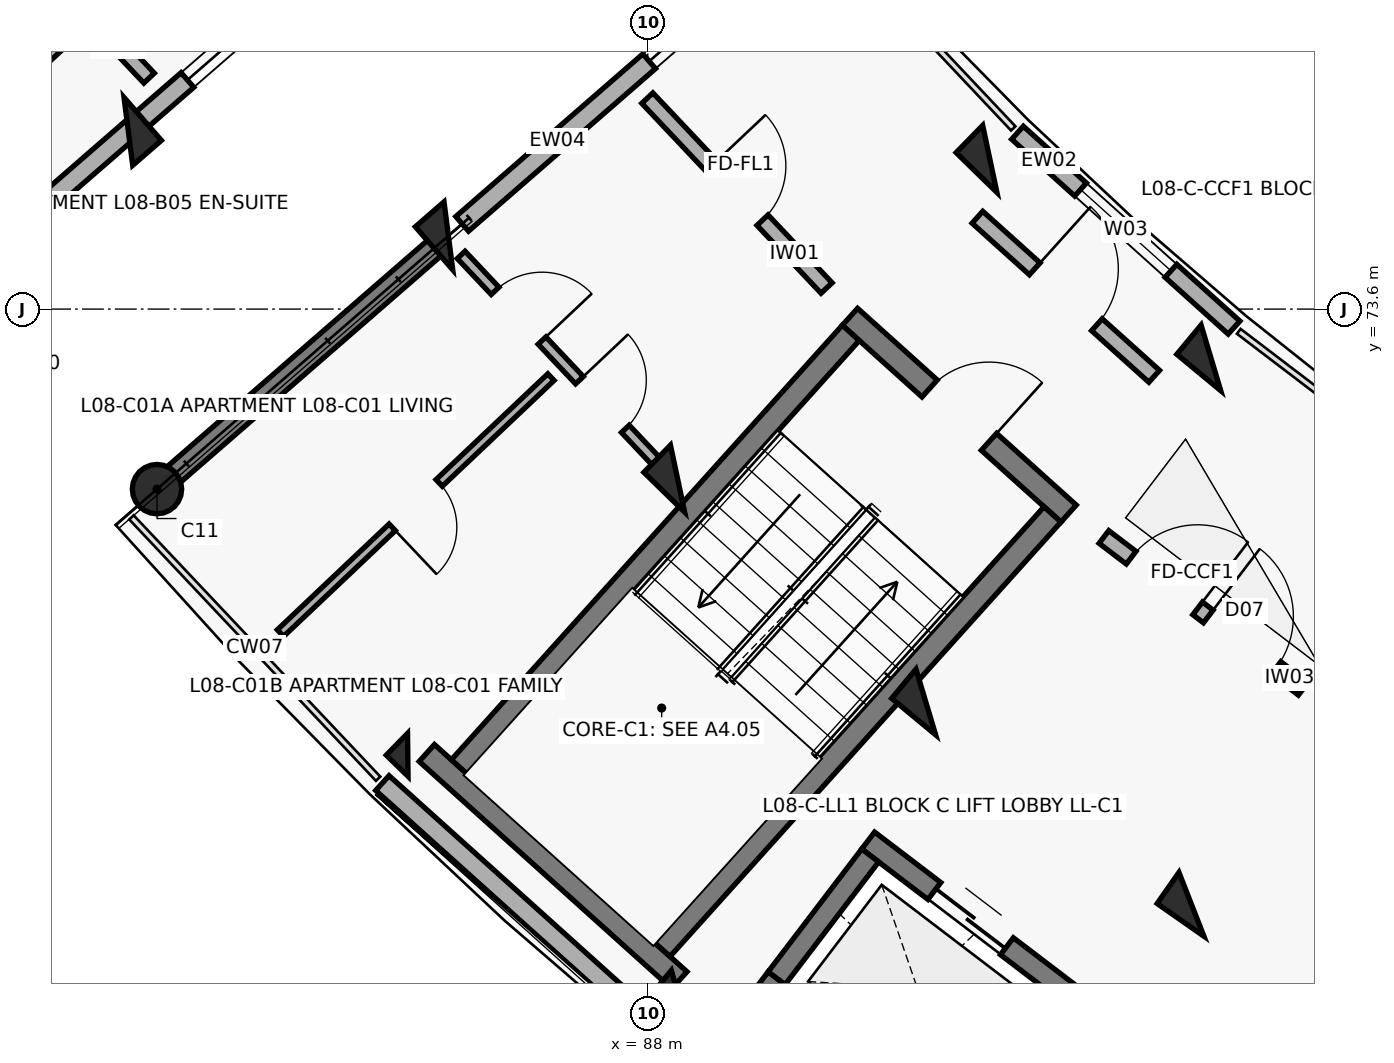
"""IFC4 building model, lengths in metres.
Left out: names, types, materials, properties, quantities, classifications, styles, units other than length and angle.
Written with IfcOpenShell. Run it as: python <this file> out.ifc"""

import sys

from ifc_helpers import new_model, si_unit, direction, frame, frame_2d, origin, origin_2d, place, context, subcontext, project, spatial, rectangle, circle, extrude, element, fill, save


model = new_model("IFC4")
c1 = context("Model", 3, precision=1e-05, world=origin(), true_north=direction((0.0, 1.0)))
c2 = subcontext(c1, "Body", "Model", "MODEL_VIEW")
j1 = project(units=[si_unit("LENGTHUNIT", "METRE"), si_unit("PLANEANGLEUNIT", "RADIAN")], contexts=[c1])
p1 = place(None, origin())
s1 = spatial("IfcSite", under=j1, at=p1, CompositionType="ELEMENT")
p2 = place(p1, origin())
s2 = spatial("IfcBuilding", under=s1, at=p2, CompositionType="ELEMENT")
p3 = place(p2, frame((0.0, 0.0, 26.7)))
s3 = spatial("IfcBuildingStorey", under=s2, at=p3, CompositionType="ELEMENT", Elevation=26.7)
for number, where, z_axis, x_axis in (
    (1, (81.166, 75.938, 0.0), (0.0, 0.0, 1.0), (0.755, 0.656, 0.0)),
    (2, (85.377, 74.564, 0.0), (0.0, 0.0, 1.0), (-0.755, -0.656, 0.0)),
):
    element("IfcColumn", number, at=place(p3, frame(where, z_axis=z_axis, x_axis=x_axis)), inside=s3, PredefinedType="COLUMN", context=c2, shape_type="SweptSolid", body=[
        extrude(rectangle(XDim=0.5, YDim=0.75, at=origin_2d()), origin(), (0.0, 0.0, 1.0), 3.1),
    ])
p4 = place(p3, frame((81.543, 71.231, 0.0), z_axis=(0.0, 0.0, 1.0), x_axis=(-0.754709580223, -0.656059028991, 0.0)))
e3 = element("IfcColumn", 3, at=p4, inside=s3, PredefinedType="COLUMN", context=c2, shape_type="SweptSolid", body=[
    extrude(circle(Radius=0.325, at=origin_2d()), origin(), (0.0, 0.0, 1.0), 3.1),
])
for number, where, z_axis, x_axis in (
    (4, (92.5, 75.576, 0.0), (0.0, 0.0, 1.0), (-0.699, -0.715, 0.0)),
    (5, (88.392, 71.369, 0.0), (0.0, 0.0, 1.0), (-0.699, -0.715, 0.0)),
):
    element("IfcColumn", number, at=place(p3, frame(where, z_axis=z_axis, x_axis=x_axis)), inside=s3, PredefinedType="COLUMN", context=c2, shape_type="SweptSolid", body=[
        extrude(rectangle(XDim=0.5, YDim=0.75, at=origin_2d()), origin(), (0.0, 0.0, 1.0), 3.1),
    ])
p5 = place(p3, frame((84.843, 67.734, 0.0), z_axis=(0.0, 0.0, 1.0), x_axis=(-0.698665066769, -0.715448897181, 0.0)))
e6 = element("IfcColumn", 6, at=p5, inside=s3, PredefinedType="COLUMN", context=c2, shape_type="SweptSolid", body=[
    extrude(rectangle(XDim=0.4, YDim=0.4, at=origin_2d()), origin(), (0.0, 0.0, 1.0), 3.1),
])
for number, where, z_axis, x_axis in (
    (7, (95.409, 72.958, 0.0), (0.0, 0.0, 1.0), (-0.638, -0.77, 0.0)),
    (8, (91.658, 68.43, 0.0), (0.0, 0.0, 1.0), (-0.638, -0.77, 0.0)),
):
    element("IfcColumn", number, at=place(p3, frame(where, z_axis=z_axis, x_axis=x_axis)), inside=s3, PredefinedType="COLUMN", context=c2, shape_type="SweptSolid", body=[
        extrude(rectangle(XDim=0.5, YDim=0.75, at=origin_2d()), origin(), (0.0, 0.0, 1.0), 3.1),
    ])
p6 = place(p3, frame((88.417, 64.518, 0.0), z_axis=(0.0, 0.0, 1.0), x_axis=(-0.637961754089, -0.770068049148, 0.0)))
e9 = element("IfcColumn", 9, at=p6, inside=s3, PredefinedType="COLUMN", context=c2, shape_type="SweptSolid", body=[
    extrude(rectangle(XDim=0.45, YDim=0.65, at=origin_2d()), origin(), (0.0, 0.0, 1.0), 3.1),
])
p7 = place(p3, frame((95.152, 65.768, 0.0), z_axis=(0.0, 0.0, 1.0), x_axis=(-0.573004420611, -0.819552276527, 0.0)))
e10 = element("IfcColumn", 10, at=p7, inside=s3, PredefinedType="COLUMN", context=c2, shape_type="SweptSolid", body=[
    extrude(rectangle(XDim=0.5, YDim=0.75, at=origin_2d()), origin(), (0.0, 0.0, 1.0), 3.1),
])
p8 = place(p3, frame((85.241, 74.446, 0.0), z_axis=(0.0, 0.0, 1.0), x_axis=(-0.754703505217, -0.65606601742, 0.0)))
e11 = element("IfcWall", 11, at=p8, inside=s3, PredefinedType="SHEAR", context=c2, shape_type="SweptSolid", body=[
    extrude(rectangle(XDim=4.72, YDim=0.27, at=frame_2d((2.36, 0.0))), origin(), (0.0, 0.0, 1.0), 2.86),
])
p9 = place(p3, frame((79.234, 74.259, 0.0), z_axis=(0.0, 0.0, 1.0), x_axis=(0.754717680958, 0.656049710044, 0.0)))
e12 = element("IfcWall", 12, at=p9, inside=s3, PredefinedType="SOLIDWALL", context=c2, shape_type="SweptSolid", body=[
    extrude(rectangle(XDim=8.2, YDim=0.255, at=frame_2d((4.1, 0.0))), origin(), (0.0, 0.0, 1.0), 2.18),
])
p10 = place(p9, frame((3.59, 0.0, 0.75)))
e13 = element("IfcOpeningElement", 13, at=p10, cuts=e12, PredefinedType="OPENING", context=c2, shape_type="SweptSolid", body=[
    extrude(rectangle(XDim=1.35, YDim=1.35, at=frame_2d((0.675, 0.675))), frame((0.0, 0.137, 0.0), z_axis=(0.0, -1.0, 0.0), x_axis=(1.0, 0.0, 0.0)), (0.0, 0.0, 1.0), 0.275),
])
p11 = place(p3, frame((84.508, 67.363, 0.0), z_axis=(0.0, 0.0, 1.0), x_axis=(0.743387539862, -0.668860946369, 0.0)))
e14 = element("IfcWall", 14, at=p11, inside=s3, PredefinedType="SOLIDWALL", context=c2, shape_type="SweptSolid", body=[
    extrude(rectangle(XDim=4.809, YDim=0.262, at=frame_2d((2.405, 0.0))), origin(), (0.0, 0.0, 1.0), 2.25),
])
p12 = place(p3, frame((92.864, 75.92, 0.0), z_axis=(0.0, 0.0, 1.0), x_axis=(0.743363835609, -0.668887290886, 0.0)))
e15 = element("IfcWall", 15, at=p12, inside=s3, PredefinedType="SOLIDWALL", context=c2, shape_type="SweptSolid", body=[
    extrude(rectangle(XDim=3.832, YDim=0.23, at=frame_2d((1.916, 0.0))), origin(), (0.0, 0.0, 1.0), 2.25),
])
p13 = place(p12, frame((1.116, 0.0, 0.32)))
e16 = element("IfcOpeningElement", 16, at=p13, cuts=e15, PredefinedType="OPENING", context=c2, shape_type="SweptSolid", body=[
    extrude(rectangle(XDim=1.6, YDim=1.5, at=frame_2d((0.8, 0.75))), frame((0.0, 0.125, 0.0), z_axis=(0.0, -1.0, 0.0), x_axis=(1.0, 0.0, 0.0)), (0.0, 0.0, 1.0), 0.25),
])
p14 = place(p3, frame((89.633, 78.264, 0.0), z_axis=(0.0, 0.0, 1.0), x_axis=(-0.754709658894, -0.65605893849, 0.0)))
e17 = element("IfcWall", 17, at=p14, inside=s3, PredefinedType="SOLIDWALL", context=c2, shape_type="SweptSolid", body=[
    extrude(rectangle(XDim=5.4, YDim=0.255, at=frame_2d((2.7, 0.0))), origin(), (0.0, 0.0, 1.0), 2.18),
])
p15 = place(p14, frame((0.79, 0.0, 0.75)))
e18 = element("IfcOpeningElement", 18, at=p15, cuts=e17, PredefinedType="OPENING", context=c2, shape_type="SweptSolid", body=[
    extrude(rectangle(XDim=1.35, YDim=1.35, at=frame_2d((0.675, 0.675))), frame((0.0, 0.137, 0.0), z_axis=(0.0, -1.0, 0.0), x_axis=(1.0, 0.0, 0.0)), (0.0, 0.0, 1.0), 0.275),
])
p16 = place(p3, frame((90.66, 73.499, 0.0), z_axis=(0.0, 0.0, 1.0), x_axis=(0.743375696158, -0.668874109501, 0.0)))
e19 = element("IfcWall", 19, at=p16, inside=s3, PredefinedType="SHEAR", context=c2, shape_type="SweptSolid", body=[
    extrude(rectangle(XDim=3.87, YDim=0.3, at=frame_2d((1.935, 0.0))), origin(), (0.0, 0.0, 1.0), 3.1),
])
p17 = place(p16, frame((1.41, 0.0, 0.0)))
e20 = element("IfcOpeningElement", 20, at=p17, cuts=e19, PredefinedType="OPENING", context=c2, shape_type="SweptSolid", body=[
    extrude(rectangle(XDim=1.05, YDim=2.15, at=frame_2d((0.525, 1.075))), frame((0.0, 0.16, 0.0), z_axis=(0.0, -1.0, 0.0), x_axis=(1.0, 0.0, 0.0)), (0.0, 0.0, 1.0), 0.32),
])
p18 = place(p3, frame((85.093, 67.76, 0.0), z_axis=(0.0, 0.0, 1.0), x_axis=(0.743372896184, -0.668877221333, 0.0)))
e21 = element("IfcWall", 21, at=p18, inside=s3, PredefinedType="SHEAR", context=c2, shape_type="SweptSolid", body=[
    extrude(rectangle(XDim=4.47, YDim=0.3, at=frame_2d((2.235, 0.0))), origin(), (0.0, 0.0, 1.0), 3.1),
])
p19 = place(p3, frame((90.671, 73.287, 0.0), z_axis=(0.0, 0.0, 1.0), x_axis=(-0.668885797871, -0.743365179038, 0.0)))
e22 = element("IfcWall", 22, at=p19, inside=s3, PredefinedType="SHEAR", context=c2, shape_type="SweptSolid", body=[
    extrude(rectangle(XDim=7.69, YDim=0.3, at=frame_2d((3.845, 0.0))), origin(), (0.0, 0.0, 1.0), 3.1),
])
p20 = place(p3, frame((93.325, 70.899, 0.0), z_axis=(0.0, 0.0, 1.0), x_axis=(-0.668868253964, -0.743380964808, 0.0)))
e23 = element("IfcWall", 23, at=p20, inside=s3, PredefinedType="SHEAR", context=c2, shape_type="SweptSolid", body=[
    extrude(rectangle(XDim=7.69, YDim=0.3, at=frame_2d((3.845, 0.0))), origin(), (0.0, 0.0, 1.0), 3.1),
])
p21 = place(p3, frame((90.899, 66.607, 0.0), z_axis=(0.0, 0.0, 1.0), x_axis=(0.795439986025, -0.606032365994, 0.0)))
e24 = element("IfcWall", 24, at=p21, inside=s3, PredefinedType="SHEAR", context=c2, shape_type="SweptSolid", body=[
    extrude(rectangle(XDim=3.39, YDim=0.28, at=frame_2d((1.695, 0.0))), origin(), (0.0, 0.0, 1.0), 3.1),
])
p22 = place(p21, frame((1.095, 0.0, 0.0)))
e25 = element("IfcOpeningElement", 25, at=p22, cuts=e24, PredefinedType="OPENING", context=c2, shape_type="SweptSolid", body=[
    extrude(rectangle(XDim=1.2, YDim=2.15, at=frame_2d((0.6, 1.075))), frame((0.0, 0.15, 0.0), z_axis=(0.0, -1.0, 0.0), x_axis=(1.0, 0.0, 0.0)), (0.0, 0.0, 1.0), 0.3),
])
p23 = place(p3, frame((89.5, 64.77, 0.0), z_axis=(0.0, 0.0, 1.0), x_axis=(0.795474703455, -0.605986795371, 0.0)))
e26 = element("IfcWall", 26, at=p23, inside=s3, PredefinedType="SHEAR", context=c2, shape_type="SweptSolid", body=[
    extrude(rectangle(XDim=3.39, YDim=0.28, at=frame_2d((1.695, 0.0))), origin(), (0.0, 0.0, 1.0), 3.1),
])
p24 = place(p3, frame((90.926, 66.411, 0.0), z_axis=(0.0, 0.0, 1.0), x_axis=(-0.605948992168, -0.795503500238, 0.0)))
e27 = element("IfcWall", 27, at=p24, inside=s3, PredefinedType="SHEAR", context=c2, shape_type="SweptSolid", body=[
    extrude(rectangle(XDim=2.03, YDim=0.28, at=frame_2d((1.015, 0.0))), origin(), (0.0, 0.0, 1.0), 3.1),
])
p25 = place(p3, frame((79.195, 79.016, 0.0), z_axis=(0.0, 0.0, 1.0), x_axis=(0.686307658735, -0.727311348434, 0.0)))
e28 = element("IfcWall", 28, at=p25, inside=s3, PredefinedType="SOLIDWALL", context=c2, shape_type="SweptSolid", body=[
    extrude(rectangle(XDim=3.269, YDim=0.19, at=frame_2d((1.634, 0.0))), origin(), (0.0, 0.0, 1.0), 2.08),
])
p26 = place(p25, frame((1.174, 0.0, 0.0)))
e29 = element("IfcOpeningElement", 29, at=p26, cuts=e28, PredefinedType="OPENING", context=c2, shape_type="SweptSolid", body=[
    extrude(rectangle(XDim=0.92, YDim=2.1, at=frame_2d((0.46, 1.05))), frame((0.0, 0.105, 0.0), z_axis=(0.0, -1.0, 0.0), x_axis=(1.0, 0.0, 0.0)), (0.0, 0.0, 1.0), 0.21),
])
p27 = place(p3, frame((78.163, 75.139, 0.0), z_axis=(0.0, 0.0, 1.0), x_axis=(0.734519733107, 0.678587327967, 0.0)))
e30 = element("IfcWall", 30, at=p27, inside=s3, PredefinedType="PARTITIONING", context=c2, shape_type="SweptSolid", body=[
    extrude(rectangle(XDim=3.3, YDim=0.145, at=frame_2d((1.65, 0.0))), origin(), (0.0, 0.0, 1.0), 2.08),
])
p28 = place(p27, frame((1.21, 0.0, 0.0)))
e31 = element("IfcOpeningElement", 31, at=p28, cuts=e30, PredefinedType="OPENING", context=c2, shape_type="SweptSolid", body=[
    extrude(rectangle(XDim=0.88, YDim=2.1, at=frame_2d((0.44, 1.05))), frame((0.0, 0.083, 0.0), z_axis=(0.0, -1.0, 0.0), x_axis=(1.0, 0.0, 0.0)), (0.0, 0.0, 1.0), 0.165),
])
p29 = place(p3, frame((87.994, 76.376, 0.0), z_axis=(0.0, 0.0, 1.0), x_axis=(0.686310507227, -0.727308660522, 0.0)))
e32 = element("IfcWall", 32, at=p29, inside=s3, PredefinedType="SOLIDWALL", context=c2, shape_type="SweptSolid", body=[
    extrude(rectangle(XDim=3.436, YDim=0.2, at=frame_2d((1.718, 0.0))), origin(), (0.0, 0.0, 1.0), 2.08),
])
p30 = place(p29, frame((1.228, 0.0, 0.0)))
e33 = element("IfcOpeningElement", 33, at=p30, cuts=e32, PredefinedType="OPENING", context=c2, shape_type="SweptSolid", body=[
    extrude(rectangle(XDim=0.98, YDim=2.15, at=frame_2d((0.49, 1.075))), frame((0.0, 0.11, 0.0), z_axis=(0.0, -1.0, 0.0), x_axis=(1.0, 0.0, 0.0)), (0.0, 0.0, 1.0), 0.22),
])
p31 = place(p3, frame((85.545, 74.313, 0.0), z_axis=(0.0, 0.0, 1.0), x_axis=(0.686332741542, -0.727287678906, 0.0)))
e34 = element("IfcWall", 34, at=p31, inside=s3, PredefinedType="PARTITIONING", context=c2, shape_type="SweptSolid", body=[
    extrude(rectangle(XDim=3.797, YDim=0.14, at=frame_2d((1.899, 0.0))), origin(), (0.0, 0.0, 1.0), 2.08),
])
p32 = place(p31, frame((0.65, 0.0, 0.0)))
e35 = element("IfcOpeningElement", 35, at=p32, cuts=e34, PredefinedType="OPENING", context=c2, shape_type="SweptSolid", body=[
    extrude(rectangle(XDim=0.9, YDim=2.1, at=frame_2d((0.45, 1.05))), frame((0.0, 0.08, 0.0), z_axis=(0.0, -1.0, 0.0), x_axis=(1.0, 0.0, 0.0)), (0.0, 0.0, 1.0), 0.16),
])
p33 = place(p31, frame((2.267, 0.0, 0.0)))
e36 = element("IfcOpeningElement", 36, at=p33, cuts=e34, PredefinedType="OPENING", context=c2, shape_type="SweptSolid", body=[
    extrude(rectangle(XDim=0.88, YDim=2.1, at=frame_2d((0.44, 1.05))), frame((0.0, 0.08, 0.0), z_axis=(0.0, -1.0, 0.0), x_axis=(1.0, 0.0, 0.0)), (0.0, 0.0, 1.0), 0.16),
])
p34 = place(p3, frame((86.726, 72.705, 0.0), z_axis=(0.0, 0.0, 1.0), x_axis=(-0.726270746475, -0.687408759629, 0.0)))
e37 = element("IfcWall", 37, at=p34, inside=s3, PredefinedType="PARTITIONING", context=c2, shape_type="SweptSolid", body=[
    extrude(rectangle(XDim=4.9, YDim=0.12, at=frame_2d((2.45, 0.0))), origin(), (0.0, 0.0, 1.0), 2.08),
])
p35 = place(p34, frame((2.025, 0.0, 0.0)))
e38 = element("IfcOpeningElement", 38, at=p35, cuts=e37, PredefinedType="OPENING", context=c2, shape_type="SweptSolid", body=[
    extrude(rectangle(XDim=0.85, YDim=2.1, at=frame_2d((0.425, 1.05))), frame((0.0, 0.07, 0.0), z_axis=(0.0, -1.0, 0.0), x_axis=(1.0, 0.0, 0.0)), (0.0, 0.0, 1.0), 0.14),
])
p36 = place(p3, frame((92.337, 74.808, 0.0), z_axis=(0.0, 0.0, 1.0), x_axis=(0.743348465558, -0.668904371904, 0.0)))
e39 = element("IfcWall", 39, at=p36, inside=s3, PredefinedType="SOLIDWALL", context=c2, shape_type="SweptSolid", body=[
    extrude(rectangle(XDim=3.129, YDim=0.21, at=frame_2d((1.564, 0.0))), origin(), (0.0, 0.0, 1.0), 2.08),
])
p37 = place(p36, frame((1.014, 0.0, 0.0)))
e40 = element("IfcOpeningElement", 40, at=p37, cuts=e39, PredefinedType="OPENING", context=c2, shape_type="SweptSolid", body=[
    extrude(rectangle(XDim=1.1, YDim=2.15, at=frame_2d((0.55, 1.075))), frame((0.0, 0.115, 0.0), z_axis=(0.0, -1.0, 0.0), x_axis=(1.0, 0.0, 0.0)), (0.0, 0.0, 1.0), 0.23),
])
p38 = place(p3, frame((94.001, 70.602, 0.0), z_axis=(0.0, 0.0, 1.0), x_axis=(0.795498026433, -0.605956178235, 0.0)))
e41 = element("IfcWall", 41, at=p38, inside=s3, PredefinedType="SOLIDWALL", context=c2, shape_type="SweptSolid", body=[
    extrude(rectangle(XDim=3.296, YDim=0.21, at=frame_2d((1.648, 0.0))), origin(), (0.0, 0.0, 1.0), 2.08),
])
p39 = place(p38, frame((0.45, 0.0, 0.0)))
e42 = element("IfcOpeningElement", 42, at=p39, cuts=e41, PredefinedType="OPENING", context=c2, shape_type="SweptSolid", body=[
    extrude(rectangle(XDim=1.1, YDim=2.15, at=frame_2d((0.55, 1.075))), frame((0.0, 0.115, 0.0), z_axis=(0.0, -1.0, 0.0), x_axis=(1.0, 0.0, 0.0)), (0.0, 0.0, 1.0), 0.23),
])
p40 = place(p38, frame((1.726, 0.0, 0.0)))
e43 = element("IfcOpeningElement", 43, at=p40, cuts=e41, PredefinedType="OPENING", context=c2, shape_type="SweptSolid", body=[
    extrude(rectangle(XDim=1.12, YDim=2.15, at=frame_2d((0.56, 1.075))), frame((0.0, 0.115, 0.0), z_axis=(0.0, -1.0, 0.0), x_axis=(1.0, 0.0, 0.0)), (0.0, 0.0, 1.0), 0.23),
])
p41 = place(p3, frame((98.504, 67.072, 0.0), z_axis=(0.0, 0.0, 1.0), x_axis=(-0.540338452216, -0.841447774408, 0.0)))
e44 = element("IfcWall", 44, at=p41, inside=s3, PredefinedType="PARTITIONING", context=c2, shape_type="SweptSolid", body=[
    extrude(rectangle(XDim=7.95, YDim=0.14, at=frame_2d((3.975, 0.0))), origin(), (0.0, 0.0, 1.0), 2.08),
])
p42 = place(p41, frame((6.05, 0.0, 0.0)))
e45 = element("IfcOpeningElement", 45, at=p42, cuts=e44, PredefinedType="OPENING", context=c2, shape_type="SweptSolid", body=[
    extrude(rectangle(XDim=0.92, YDim=2.1, at=frame_2d((0.46, 1.05))), frame((0.0, 0.08, 0.0), z_axis=(0.0, -1.0, 0.0), x_axis=(1.0, 0.0, 0.0)), (0.0, 0.0, 1.0), 0.16),
])
p43 = place(p10, origin())
e46 = element("IfcWindow", 46, at=p43, inside=s3, PartitioningType="DOUBLE_PANEL_VERTICAL", PredefinedType="WINDOW", context=c2, shape_type="SweptSolid", body=[
    extrude(rectangle(XDim=1.35, YDim=1.35, at=frame_2d((0.675, 0.675))), frame((0.0, 0.03, 0.0), z_axis=(0.0, -1.0, 0.0), x_axis=(1.0, 0.0, 0.0)), (0.0, 0.0, 1.0), 0.06),
])
fill(e13, e46)
p44 = place(p13, origin())
e47 = element("IfcWindow", 47, at=p44, inside=s3, PartitioningType="DOUBLE_PANEL_VERTICAL", PredefinedType="WINDOW", context=c2, shape_type="SweptSolid", body=[
    extrude(rectangle(XDim=1.6, YDim=1.5, at=frame_2d((0.8, 0.75))), frame((0.0, 0.03, 0.0), z_axis=(0.0, -1.0, 0.0), x_axis=(1.0, 0.0, 0.0)), (0.0, 0.0, 1.0), 0.06),
])
fill(e16, e47)
p45 = place(p15, origin())
e48 = element("IfcWindow", 48, at=p45, inside=s3, PartitioningType="DOUBLE_PANEL_VERTICAL", PredefinedType="WINDOW", context=c2, shape_type="SweptSolid", body=[
    extrude(rectangle(XDim=1.35, YDim=1.35, at=frame_2d((0.675, 0.675))), frame((0.0, 0.03, 0.0), z_axis=(0.0, -1.0, 0.0), x_axis=(1.0, 0.0, 0.0)), (0.0, 0.0, 1.0), 0.06),
])
fill(e18, e48)
p46 = place(p17, origin())
e49 = element("IfcDoor", 49, at=p46, inside=s3, OperationType="SINGLE_SWING_RIGHT", PredefinedType="DOOR", context=c2, shape_type="SweptSolid", body=[
    extrude(rectangle(XDim=1.05, YDim=2.15, at=frame_2d((0.525, 1.075))), frame((0.0, 0.025, 0.0), z_axis=(0.0, -1.0, 0.0), x_axis=(1.0, 0.0, 0.0)), (0.0, 0.0, 1.0), 0.05),
])
fill(e20, e49)
p47 = place(p22, origin())
e50 = element("IfcDoor", 50, at=p47, inside=s3, OperationType="DOUBLE_DOOR_SLIDING", PredefinedType="DOOR", context=c2, shape_type="SweptSolid", body=[
    extrude(rectangle(XDim=1.2, YDim=2.15, at=frame_2d((0.6, 1.075))), frame((0.0, 0.025, 0.0), z_axis=(0.0, -1.0, 0.0), x_axis=(1.0, 0.0, 0.0)), (0.0, 0.0, 1.0), 0.05),
])
fill(e25, e50)
p48 = place(p30, origin())
e51 = element("IfcDoor", 51, at=p48, inside=s3, OperationType="SINGLE_SWING_LEFT", PredefinedType="DOOR", context=c2, shape_type="SweptSolid", body=[
    extrude(rectangle(XDim=0.98, YDim=2.15, at=frame_2d((0.49, 1.075))), frame((0.0, 0.025, 0.0), z_axis=(0.0, -1.0, 0.0), x_axis=(1.0, 0.0, 0.0)), (0.0, 0.0, 1.0), 0.05),
])
fill(e33, e51)
p49 = place(p32, origin())
e52 = element("IfcDoor", 52, at=p49, inside=s3, OperationType="SINGLE_SWING_RIGHT", PredefinedType="DOOR", context=c2, shape_type="SweptSolid", body=[
    extrude(rectangle(XDim=0.9, YDim=2.1, at=frame_2d((0.45, 1.05))), frame((0.0, 0.025, 0.0), z_axis=(0.0, -1.0, 0.0), x_axis=(1.0, 0.0, 0.0)), (0.0, 0.0, 1.0), 0.05),
])
fill(e35, e52)
p50 = place(p33, origin())
e53 = element("IfcDoor", 53, at=p50, inside=s3, OperationType="SINGLE_SWING_LEFT", PredefinedType="DOOR", context=c2, shape_type="SweptSolid", body=[
    extrude(rectangle(XDim=0.88, YDim=2.1, at=frame_2d((0.44, 1.05))), frame((0.0, 0.025, 0.0), z_axis=(0.0, -1.0, 0.0), x_axis=(1.0, 0.0, 0.0)), (0.0, 0.0, 1.0), 0.05),
])
fill(e36, e53)
p51 = place(p35, origin())
e54 = element("IfcDoor", 54, at=p51, inside=s3, OperationType="SINGLE_SWING_RIGHT", PredefinedType="DOOR", context=c2, shape_type="SweptSolid", body=[
    extrude(rectangle(XDim=0.85, YDim=2.1, at=frame_2d((0.425, 1.05))), frame((0.0, 0.025, 0.0), z_axis=(0.0, -1.0, 0.0), x_axis=(1.0, 0.0, 0.0)), (0.0, 0.0, 1.0), 0.05),
])
fill(e38, e54)
p52 = place(p37, origin())
e55 = element("IfcDoor", 55, at=p52, inside=s3, OperationType="SINGLE_SWING_LEFT", PredefinedType="DOOR", context=c2, shape_type="SweptSolid", body=[
    extrude(rectangle(XDim=1.1, YDim=2.15, at=frame_2d((0.55, 1.075))), frame((0.0, 0.025, 0.0), z_axis=(0.0, -1.0, 0.0), x_axis=(1.0, 0.0, 0.0)), (0.0, 0.0, 1.0), 0.05),
])
fill(e40, e55)
p53 = place(p39, origin())
e56 = element("IfcDoor", 56, at=p53, inside=s3, OperationType="SINGLE_SWING_RIGHT", PredefinedType="DOOR", context=c2, shape_type="SweptSolid", body=[
    extrude(rectangle(XDim=1.1, YDim=2.15, at=frame_2d((0.55, 1.075))), frame((0.0, 0.025, 0.0), z_axis=(0.0, -1.0, 0.0), x_axis=(1.0, 0.0, 0.0)), (0.0, 0.0, 1.0), 0.05),
])
fill(e42, e56)
p54 = place(p40, origin())
e57 = element("IfcDoor", 57, at=p54, inside=s3, OperationType="SINGLE_SWING_LEFT", PredefinedType="DOOR", context=c2, shape_type="SweptSolid", body=[
    extrude(rectangle(XDim=1.12, YDim=2.15, at=frame_2d((0.56, 1.075))), frame((0.0, 0.025, 0.0), z_axis=(0.0, -1.0, 0.0), x_axis=(1.0, 0.0, 0.0)), (0.0, 0.0, 1.0), 0.05),
])
fill(e43, e57)
save(model, sys.argv[1])
